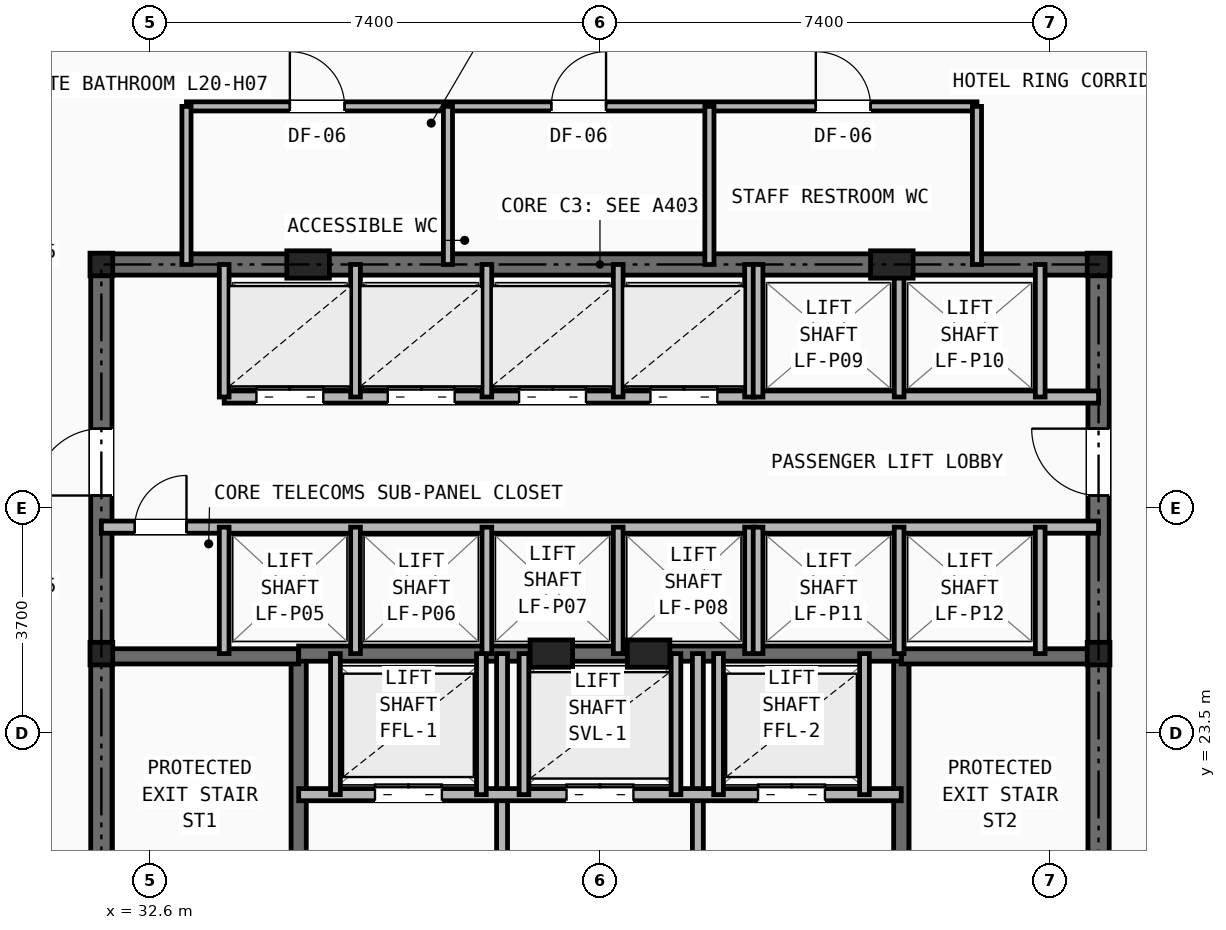
"""IFC4 building model, lengths in metres.
Left out: names, types, materials, properties, quantities, classifications, styles, units other than length and angle.
Written with IfcOpenShell. Run it as: python <this file> out.ifc"""

import sys

from ifc_helpers import new_model, si_unit, direction, frame, frame_2d, origin, origin_2d, place, context, subcontext, project, spatial, rectangle, i_section, extrude, element, fill, save


model = new_model("IFC4")
c1 = context("Model", 3, precision=1e-05, world=origin(), true_north=direction((0.0, 1.0)))
c2 = subcontext(c1, "Body", "Model", "MODEL_VIEW")
j1 = project(units=[si_unit("LENGTHUNIT", "METRE"), si_unit("PLANEANGLEUNIT", "RADIAN")], contexts=[c1])
p1 = place(None, origin())
s1 = spatial("IfcSite", under=j1, at=p1, CompositionType="ELEMENT")
p2 = place(p1, origin())
s2 = spatial("IfcBuilding", under=s1, at=p2, CompositionType="ELEMENT")
p3 = place(p2, frame((0.0, 0.0, 73.4)))
s3 = spatial("IfcBuildingStorey", under=s2, at=p3, CompositionType="ELEMENT", Elevation=73.4)
for number, where, z_axis, x_axis in (
    (1, (31.8, 24.8, 0.0), (0.0, 0.0, 1.0), (1.0, 0.0, 0.0)),
    (2, (48.2, 24.8, 0.0), (0.0, 0.0, 1.0), (1.0, 0.0, 0.0)),
    (3, (31.8, 31.2, 0.0), (0.0, 0.0, 1.0), (1.0, 0.0, 0.0)),
    (4, (48.2, 31.2, 0.0), (0.0, 0.0, 1.0), (1.0, 0.0, 0.0)),
):
    element("IfcColumn", number, at=place(p3, frame(where, z_axis=z_axis, x_axis=x_axis)), inside=s3, PredefinedType="COLUMN", context=c2, shape_type="SweptSolid", body=[
        extrude(i_section(OverallWidth=0.374, OverallDepth=0.372, WebThickness=0.016, FlangeThickness=0.026, at=origin_2d()), origin(), (0.0, 0.0, 1.0), 3.2),
    ])
for number, where, z_axis, x_axis in (
    (5, (35.2, 31.2, 0.0), (0.0, 0.0, 1.0), (1.0, 0.0, 0.0)),
    (6, (44.8, 31.2, 0.0), (0.0, 0.0, 1.0), (1.0, 0.0, 0.0)),
    (7, (39.2, 24.8, 0.0), (0.0, 0.0, 1.0), (1.0, 0.0, 0.0)),
    (8, (40.8, 24.8, 0.0), (0.0, 0.0, 1.0), (1.0, 0.0, 0.0)),
):
    element("IfcColumn", number, at=place(p3, frame(where, z_axis=z_axis, x_axis=x_axis)), inside=s3, PredefinedType="PILASTER", context=c2, shape_type="SweptSolid", body=[
        extrude(rectangle(XDim=0.7, YDim=0.45, at=origin_2d()), origin(), (0.0, 0.0, 1.0), 3.2),
    ])
p4 = place(p3, frame((31.8, 31.2, 0.0), z_axis=(0.0, 0.0, 1.0), x_axis=(1.0, 0.0, 0.0)))
e9 = element("IfcWall", 9, at=p4, inside=s3, PredefinedType="SHEAR", context=c2, shape_type="SweptSolid", body=[
    extrude(rectangle(XDim=16.4, YDim=0.35, at=frame_2d((8.2, 0.0))), origin(), (0.0, 0.0, 1.0), 2.97),
])
p5 = place(p3, frame((31.8, 16.4, 0.0), z_axis=(0.0, 0.0, 1.0), x_axis=(0.0, 1.0, 0.0)))
e10 = element("IfcWall", 10, at=p5, inside=s3, PredefinedType="SHEAR", context=c2, shape_type="SweptSolid", body=[
    extrude(rectangle(XDim=14.8, YDim=0.35, at=frame_2d((7.4, 0.0))), origin(), (0.0, 0.0, 1.0), 2.97),
])
p6 = place(p5, frame((11.0, 0.0, 0.0)))
e11 = element("IfcOpeningElement", 11, at=p6, cuts=e10, PredefinedType="OPENING", context=c2, shape_type="SweptSolid", body=[
    extrude(rectangle(XDim=1.1, YDim=2.15, at=frame_2d((0.55, 1.075))), frame((0.0, 0.185, 0.0), z_axis=(0.0, -1.0, 0.0), x_axis=(1.0, 0.0, 0.0)), (0.0, 0.0, 1.0), 0.37),
])
p7 = place(p3, frame((48.2, 16.4, 0.0), z_axis=(0.0, 0.0, 1.0), x_axis=(0.0, 1.0, 0.0)))
e12 = element("IfcWall", 12, at=p7, inside=s3, PredefinedType="SHEAR", context=c2, shape_type="SweptSolid", body=[
    extrude(rectangle(XDim=14.8, YDim=0.35, at=frame_2d((7.4, 0.0))), origin(), (0.0, 0.0, 1.0), 2.97),
])
p8 = place(p7, frame((11.0, 0.0, 0.0)))
e13 = element("IfcOpeningElement", 13, at=p8, cuts=e12, PredefinedType="OPENING", context=c2, shape_type="SweptSolid", body=[
    extrude(rectangle(XDim=1.1, YDim=2.15, at=frame_2d((0.55, 1.075))), frame((0.0, 0.185, 0.0), z_axis=(0.0, -1.0, 0.0), x_axis=(1.0, 0.0, 0.0)), (0.0, 0.0, 1.0), 0.37),
])
p9 = place(p3, frame((35.045, 16.4, 0.0), z_axis=(0.0, 0.0, 1.0), x_axis=(0.0, 1.0, 0.0)))
e14 = element("IfcWall", 14, at=p9, inside=s3, PredefinedType="SHEAR", context=c2, shape_type="SweptSolid", body=[
    extrude(rectangle(XDim=8.4, YDim=0.25, at=frame_2d((4.2, 0.0))), origin(), (0.0, 0.0, 1.0), 2.97),
])
p10 = place(p9, frame((0.45, 0.0, 0.0)))
e15 = element("IfcOpeningElement", 15, at=p10, cuts=e14, PredefinedType="OPENING", context=c2, shape_type="SweptSolid", body=[
    extrude(rectangle(XDim=0.95, YDim=2.1, at=frame_2d((0.475, 1.05))), frame((0.0, 0.135, 0.0), z_axis=(0.0, -1.0, 0.0), x_axis=(1.0, 0.0, 0.0)), (0.0, 0.0, 1.0), 0.27),
])
p11 = place(p3, frame((31.8, 24.755, 0.0), z_axis=(0.0, 0.0, 1.0), x_axis=(1.0, 0.0, 0.0)))
e16 = element("IfcWall", 16, at=p11, inside=s3, PredefinedType="SHEAR", context=c2, shape_type="SweptSolid", body=[
    extrude(rectangle(XDim=3.245, YDim=0.25, at=frame_2d((1.623, 0.0))), origin(), (0.0, 0.0, 1.0), 2.97),
])
p12 = place(p3, frame((44.955, 16.4, 0.0), z_axis=(0.0, 0.0, 1.0), x_axis=(0.0, 1.0, 0.0)))
e17 = element("IfcWall", 17, at=p12, inside=s3, PredefinedType="SHEAR", context=c2, shape_type="SweptSolid", body=[
    extrude(rectangle(XDim=8.4, YDim=0.25, at=frame_2d((4.2, 0.0))), origin(), (0.0, 0.0, 1.0), 2.97),
])
p13 = place(p12, frame((0.45, 0.0, 0.0)))
e18 = element("IfcOpeningElement", 18, at=p13, cuts=e17, PredefinedType="OPENING", context=c2, shape_type="SweptSolid", body=[
    extrude(rectangle(XDim=0.95, YDim=2.1, at=frame_2d((0.475, 1.05))), frame((0.0, 0.135, 0.0), z_axis=(0.0, -1.0, 0.0), x_axis=(1.0, 0.0, 0.0)), (0.0, 0.0, 1.0), 0.27),
])
p14 = place(p3, frame((44.955, 24.755, 0.0), z_axis=(0.0, 0.0, 1.0), x_axis=(1.0, 0.0, 0.0)))
e19 = element("IfcWall", 19, at=p14, inside=s3, PredefinedType="SHEAR", context=c2, shape_type="SweptSolid", body=[
    extrude(rectangle(XDim=3.245, YDim=0.25, at=frame_2d((1.623, 0.0))), origin(), (0.0, 0.0, 1.0), 2.97),
])
p15 = place(p3, frame((35.045, 24.8, 0.0), z_axis=(0.0, 0.0, 1.0), x_axis=(1.0, 0.0, 0.0)))
e20 = element("IfcWall", 20, at=p15, inside=s3, PredefinedType="SHEAR", context=c2, shape_type="SweptSolid", body=[
    extrude(rectangle(XDim=9.91, YDim=0.25, at=frame_2d((4.955, 0.0))), origin(), (0.0, 0.0, 1.0), 2.97),
])
p16 = place(p3, frame((38.39, 16.4, 0.0), z_axis=(0.0, 0.0, 1.0), x_axis=(0.0, 1.0, 0.0)))
e21 = element("IfcWall", 21, at=p16, inside=s3, PredefinedType="PARTITIONING", context=c2, shape_type="SweptSolid", body=[
    extrude(rectangle(XDim=8.4, YDim=0.18, at=frame_2d((4.2, 0.0))), origin(), (0.0, 0.0, 1.0), 2.698),
])
p17 = place(p16, frame((3.85, 0.0, 0.0)))
e22 = element("IfcOpeningElement", 22, at=p17, cuts=e21, PredefinedType="OPENING", context=c2, shape_type="SweptSolid", body=[
    extrude(rectangle(XDim=0.95, YDim=2.1, at=frame_2d((0.475, 1.05))), frame((0.0, 0.1, 0.0), z_axis=(0.0, -1.0, 0.0), x_axis=(1.0, 0.0, 0.0)), (0.0, 0.0, 1.0), 0.2),
])
p18 = place(p3, frame((41.61, 16.4, 0.0), z_axis=(0.0, 0.0, 1.0), x_axis=(0.0, 1.0, 0.0)))
e23 = element("IfcWall", 23, at=p18, inside=s3, PredefinedType="PARTITIONING", context=c2, shape_type="SweptSolid", body=[
    extrude(rectangle(XDim=8.4, YDim=0.18, at=frame_2d((4.2, 0.0))), origin(), (0.0, 0.0, 1.0), 2.698),
])
p19 = place(p3, frame((35.045, 22.48, 0.0), z_axis=(0.0, 0.0, 1.0), x_axis=(1.0, 0.0, 0.0)))
e24 = element("IfcWall", 24, at=p19, inside=s3, PredefinedType="SOLIDWALL", context=c2, shape_type="SweptSolid", body=[
    extrude(rectangle(XDim=9.91, YDim=0.2, at=frame_2d((4.955, 0.0))), origin(), (0.0, 0.0, 1.0), 2.97),
])
p20 = place(p19, frame((1.255, 0.0, 0.0)))
e25 = element("IfcOpeningElement", 25, at=p20, cuts=e24, PredefinedType="OPENING", context=c2, shape_type="SweptSolid", body=[
    extrude(rectangle(XDim=1.1, YDim=2.15, at=frame_2d((0.55, 1.075))), frame((0.0, 0.11, 0.0), z_axis=(0.0, -1.0, 0.0), x_axis=(1.0, 0.0, 0.0)), (0.0, 0.0, 1.0), 0.22),
])
p21 = place(p19, frame((7.555, 0.0, 0.0)))
e26 = element("IfcOpeningElement", 26, at=p21, cuts=e24, PredefinedType="OPENING", context=c2, shape_type="SweptSolid", body=[
    extrude(rectangle(XDim=1.1, YDim=2.15, at=frame_2d((0.55, 1.075))), frame((0.0, 0.11, 0.0), z_axis=(0.0, -1.0, 0.0), x_axis=(1.0, 0.0, 0.0)), (0.0, 0.0, 1.0), 0.22),
])
p22 = place(p19, frame((4.405, 0.0, 0.0)))
e27 = element("IfcOpeningElement", 27, at=p22, cuts=e24, PredefinedType="OPENING", context=c2, shape_type="SweptSolid", body=[
    extrude(rectangle(XDim=1.1, YDim=2.15, at=frame_2d((0.55, 1.075))), frame((0.0, 0.11, 0.0), z_axis=(0.0, -1.0, 0.0), x_axis=(1.0, 0.0, 0.0)), (0.0, 0.0, 1.0), 0.22),
])
for number, where, z_axis, x_axis in (
    (28, (35.65, 22.48, 0.0), (0.0, 0.0, 1.0), (0.0, 1.0, 0.0)),
    (29, (38.05, 22.48, 0.0), (0.0, 0.0, 1.0), (0.0, 1.0, 0.0)),
    (30, (41.95, 22.48, 0.0), (0.0, 0.0, 1.0), (0.0, 1.0, 0.0)),
    (31, (44.35, 22.48, 0.0), (0.0, 0.0, 1.0), (0.0, 1.0, 0.0)),
    (32, (38.75, 22.48, 0.0), (0.0, 0.0, 1.0), (0.0, 1.0, 0.0)),
    (33, (41.25, 22.48, 0.0), (0.0, 0.0, 1.0), (0.0, 1.0, 0.0)),
):
    element("IfcWall", number, at=place(p3, frame(where, z_axis=z_axis, x_axis=x_axis)), inside=s3, PredefinedType="SOLIDWALL", context=c2, shape_type="SweptSolid", body=[
        extrude(rectangle(XDim=2.32, YDim=0.16, at=frame_2d((1.16, 0.0))), origin(), (0.0, 0.0, 1.0), 2.97),
    ])
p23 = place(p3, frame((33.82, 29.02, 0.0), z_axis=(0.0, 0.0, 1.0), x_axis=(1.0, 0.0, 0.0)))
e34 = element("IfcWall", 34, at=p23, inside=s3, PredefinedType="SOLIDWALL", context=c2, shape_type="SweptSolid", body=[
    extrude(rectangle(XDim=14.38, YDim=0.2, at=frame_2d((7.19, 0.0))), origin(), (0.0, 0.0, 1.0), 2.421),
])
p24 = place(p23, frame((0.53, 0.0, 0.0)))
e35 = element("IfcOpeningElement", 35, at=p24, cuts=e34, PredefinedType="OPENING", context=c2, shape_type="SweptSolid", body=[
    extrude(rectangle(XDim=1.1, YDim=2.15, at=frame_2d((0.55, 1.075))), frame((0.0, 0.11, 0.0), z_axis=(0.0, -1.0, 0.0), x_axis=(1.0, 0.0, 0.0)), (0.0, 0.0, 1.0), 0.22),
])
p25 = place(p23, frame((2.69, 0.0, 0.0)))
e36 = element("IfcOpeningElement", 36, at=p25, cuts=e34, PredefinedType="OPENING", context=c2, shape_type="SweptSolid", body=[
    extrude(rectangle(XDim=1.1, YDim=2.15, at=frame_2d((0.55, 1.075))), frame((0.0, 0.11, 0.0), z_axis=(0.0, -1.0, 0.0), x_axis=(1.0, 0.0, 0.0)), (0.0, 0.0, 1.0), 0.22),
])
p26 = place(p23, frame((4.85, 0.0, 0.0)))
e37 = element("IfcOpeningElement", 37, at=p26, cuts=e34, PredefinedType="OPENING", context=c2, shape_type="SweptSolid", body=[
    extrude(rectangle(XDim=1.1, YDim=2.15, at=frame_2d((0.55, 1.075))), frame((0.0, 0.11, 0.0), z_axis=(0.0, -1.0, 0.0), x_axis=(1.0, 0.0, 0.0)), (0.0, 0.0, 1.0), 0.22),
])
p27 = place(p23, frame((7.01, 0.0, 0.0)))
e38 = element("IfcOpeningElement", 38, at=p27, cuts=e34, PredefinedType="OPENING", context=c2, shape_type="SweptSolid", body=[
    extrude(rectangle(XDim=1.1, YDim=2.15, at=frame_2d((0.55, 1.075))), frame((0.0, 0.11, 0.0), z_axis=(0.0, -1.0, 0.0), x_axis=(1.0, 0.0, 0.0)), (0.0, 0.0, 1.0), 0.22),
])
p28 = place(p3, frame((31.8, 26.88, 0.0), z_axis=(0.0, 0.0, 1.0), x_axis=(1.0, 0.0, 0.0)))
e39 = element("IfcWall", 39, at=p28, inside=s3, PredefinedType="SOLIDWALL", context=c2, shape_type="SweptSolid", body=[
    extrude(rectangle(XDim=16.4, YDim=0.2, at=frame_2d((8.2, 0.0))), origin(), (0.0, 0.0, 1.0), 2.421),
])
p29 = place(p28, frame((0.55, 0.0, 0.0)))
e40 = element("IfcOpeningElement", 40, at=p29, cuts=e39, PredefinedType="OPENING", context=c2, shape_type="SweptSolid", body=[
    extrude(rectangle(XDim=0.85, YDim=2.05, at=frame_2d((0.425, 1.025))), frame((0.0, 0.11, 0.0), z_axis=(0.0, -1.0, 0.0), x_axis=(1.0, 0.0, 0.0)), (0.0, 0.0, 1.0), 0.22),
])
p30 = place(p3, frame((33.82, 29.02, 0.0), z_axis=(0.0, 0.0, 1.0), x_axis=(0.0, 1.0, 0.0)))
e41 = element("IfcWall", 41, at=p30, inside=s3, PredefinedType="SOLIDWALL", context=c2, shape_type="SweptSolid", body=[
    extrude(rectangle(XDim=2.18, YDim=0.16, at=frame_2d((1.09, 0.0))), origin(), (0.0, 0.0, 1.0), 2.698),
])
p31 = place(p3, frame((33.82, 24.8, 0.0), z_axis=(0.0, 0.0, 1.0), x_axis=(0.0, 1.0, 0.0)))
e42 = element("IfcWall", 42, at=p31, inside=s3, PredefinedType="SOLIDWALL", context=c2, shape_type="SweptSolid", body=[
    extrude(rectangle(XDim=2.08, YDim=0.16, at=frame_2d((1.04, 0.0))), origin(), (0.0, 0.0, 1.0), 2.97),
])
for number, where, z_axis, x_axis in (
    (43, (35.98, 29.02, 0.0), (0.0, 0.0, 1.0), (0.0, 1.0, 0.0)),
    (44, (38.14, 29.02, 0.0), (0.0, 0.0, 1.0), (0.0, 1.0, 0.0)),
    (45, (40.3, 29.02, 0.0), (0.0, 0.0, 1.0), (0.0, 1.0, 0.0)),
    (46, (42.46, 29.02, 0.0), (0.0, 0.0, 1.0), (0.0, 1.0, 0.0)),
):
    element("IfcWall", number, at=place(p3, frame(where, z_axis=z_axis, x_axis=x_axis)), inside=s3, PredefinedType="SOLIDWALL", context=c2, shape_type="SweptSolid", body=[
        extrude(rectangle(XDim=2.18, YDim=0.16, at=frame_2d((1.09, 0.0))), origin(), (0.0, 0.0, 1.0), 2.698),
    ])
for number, where, z_axis, x_axis in (
    (47, (35.98, 24.8, 0.0), (0.0, 0.0, 1.0), (0.0, 1.0, 0.0)),
    (48, (38.14, 24.8, 0.0), (0.0, 0.0, 1.0), (0.0, 1.0, 0.0)),
    (49, (40.3, 24.8, 0.0), (0.0, 0.0, 1.0), (0.0, 1.0, 0.0)),
    (50, (42.46, 24.8, 0.0), (0.0, 0.0, 1.0), (0.0, 1.0, 0.0)),
):
    element("IfcWall", number, at=place(p3, frame(where, z_axis=z_axis, x_axis=x_axis)), inside=s3, PredefinedType="SOLIDWALL", context=c2, shape_type="SweptSolid", body=[
        extrude(rectangle(XDim=2.08, YDim=0.16, at=frame_2d((1.04, 0.0))), origin(), (0.0, 0.0, 1.0), 2.97),
    ])
for number, where, z_axis, x_axis in (
    (51, (42.6, 29.02, 0.0), (0.0, 0.0, 1.0), (0.0, 1.0, 0.0)),
    (52, (44.92, 29.02, 0.0), (0.0, 0.0, 1.0), (0.0, 1.0, 0.0)),
    (53, (47.24, 29.02, 0.0), (0.0, 0.0, 1.0), (0.0, 1.0, 0.0)),
):
    element("IfcWall", number, at=place(p3, frame(where, z_axis=z_axis, x_axis=x_axis)), inside=s3, PredefinedType="SOLIDWALL", context=c2, shape_type="SweptSolid", body=[
        extrude(rectangle(XDim=2.18, YDim=0.16, at=frame_2d((1.09, 0.0))), origin(), (0.0, 0.0, 1.0), 2.698),
    ])
for number, where, z_axis, x_axis in (
    (54, (42.6, 24.8, 0.0), (0.0, 0.0, 1.0), (0.0, 1.0, 0.0)),
    (55, (44.92, 24.8, 0.0), (0.0, 0.0, 1.0), (0.0, 1.0, 0.0)),
    (56, (47.24, 24.8, 0.0), (0.0, 0.0, 1.0), (0.0, 1.0, 0.0)),
):
    element("IfcWall", number, at=place(p3, frame(where, z_axis=z_axis, x_axis=x_axis)), inside=s3, PredefinedType="SOLIDWALL", context=c2, shape_type="SweptSolid", body=[
        extrude(rectangle(XDim=2.08, YDim=0.16, at=frame_2d((1.04, 0.0))), origin(), (0.0, 0.0, 1.0), 2.97),
    ])
p32 = place(p3, frame((33.2, 33.8, 0.0), z_axis=(0.0, 0.0, 1.0), x_axis=(1.0, 0.0, 0.0)))
e57 = element("IfcWall", 57, at=p32, inside=s3, PredefinedType="PARTITIONING", context=c2, shape_type="SweptSolid", body=[
    extrude(rectangle(XDim=13.0, YDim=0.15, at=frame_2d((6.5, 0.0))), origin(), (0.0, 0.0, 1.0), 2.97),
])
p33 = place(p32, frame((1.7, 0.0, 0.0)))
e58 = element("IfcOpeningElement", 58, at=p33, cuts=e57, PredefinedType="OPENING", context=c2, shape_type="SweptSolid", body=[
    extrude(rectangle(XDim=0.9, YDim=2.1, at=frame_2d((0.45, 1.05))), frame((0.0, 0.085, 0.0), z_axis=(0.0, -1.0, 0.0), x_axis=(1.0, 0.0, 0.0)), (0.0, 0.0, 1.0), 0.17),
])
p34 = place(p32, frame((6.0, 0.0, 0.0)))
e59 = element("IfcOpeningElement", 59, at=p34, cuts=e57, PredefinedType="OPENING", context=c2, shape_type="SweptSolid", body=[
    extrude(rectangle(XDim=0.9, YDim=2.1, at=frame_2d((0.45, 1.05))), frame((0.0, 0.085, 0.0), z_axis=(0.0, -1.0, 0.0), x_axis=(1.0, 0.0, 0.0)), (0.0, 0.0, 1.0), 0.17),
])
p35 = place(p32, frame((10.35, 0.0, 0.0)))
e60 = element("IfcOpeningElement", 60, at=p35, cuts=e57, PredefinedType="OPENING", context=c2, shape_type="SweptSolid", body=[
    extrude(rectangle(XDim=0.9, YDim=2.1, at=frame_2d((0.45, 1.05))), frame((0.0, 0.085, 0.0), z_axis=(0.0, -1.0, 0.0), x_axis=(1.0, 0.0, 0.0)), (0.0, 0.0, 1.0), 0.17),
])
for number, where, z_axis, x_axis in (
    (61, (33.2, 31.2, 0.0), (0.0, 0.0, 1.0), (0.0, 1.0, 0.0)),
    (62, (46.2, 31.2, 0.0), (0.0, 0.0, 1.0), (0.0, 1.0, 0.0)),
    (63, (37.5, 31.2, 0.0), (0.0, 0.0, 1.0), (0.0, 1.0, 0.0)),
    (64, (41.8, 31.2, 0.0), (0.0, 0.0, 1.0), (0.0, 1.0, 0.0)),
):
    element("IfcWall", number, at=place(p3, frame(where, z_axis=z_axis, x_axis=x_axis)), inside=s3, PredefinedType="PARTITIONING", context=c2, shape_type="SweptSolid", body=[
        extrude(rectangle(XDim=2.6, YDim=0.15, at=frame_2d((1.3, 0.0))), origin(), (0.0, 0.0, 1.0), 2.698),
    ])
p36 = place(p20, origin())
e65 = element("IfcDoor", 65, at=p36, inside=s3, OperationType="DOUBLE_DOOR_SLIDING", PredefinedType="DOOR", context=c2, shape_type="SweptSolid", body=[
    extrude(rectangle(XDim=1.1, YDim=2.15, at=frame_2d((0.55, 1.075))), frame((0.0, 0.025, 0.0), z_axis=(0.0, -1.0, 0.0), x_axis=(1.0, 0.0, 0.0)), (0.0, 0.0, 1.0), 0.05),
])
fill(e25, e65)
p37 = place(p21, origin())
e66 = element("IfcDoor", 66, at=p37, inside=s3, OperationType="DOUBLE_DOOR_SLIDING", PredefinedType="DOOR", context=c2, shape_type="SweptSolid", body=[
    extrude(rectangle(XDim=1.1, YDim=2.15, at=frame_2d((0.55, 1.075))), frame((0.0, 0.025, 0.0), z_axis=(0.0, -1.0, 0.0), x_axis=(1.0, 0.0, 0.0)), (0.0, 0.0, 1.0), 0.05),
])
fill(e26, e66)
p38 = place(p22, origin())
e67 = element("IfcDoor", 67, at=p38, inside=s3, OperationType="DOUBLE_DOOR_SLIDING", PredefinedType="DOOR", context=c2, shape_type="SweptSolid", body=[
    extrude(rectangle(XDim=1.1, YDim=2.15, at=frame_2d((0.55, 1.075))), frame((0.0, 0.025, 0.0), z_axis=(0.0, -1.0, 0.0), x_axis=(1.0, 0.0, 0.0)), (0.0, 0.0, 1.0), 0.05),
])
fill(e27, e67)
p39 = place(p29, origin())
e68 = element("IfcDoor", 68, at=p39, inside=s3, OperationType="SINGLE_SWING_RIGHT", PredefinedType="DOOR", context=c2, shape_type="SweptSolid", body=[
    extrude(rectangle(XDim=0.85, YDim=2.05, at=frame_2d((0.425, 1.025))), frame((0.0, 0.025, 0.0), z_axis=(0.0, -1.0, 0.0), x_axis=(1.0, 0.0, 0.0)), (0.0, 0.0, 1.0), 0.05),
])
fill(e40, e68)
p40 = place(p6, origin())
e69 = element("IfcDoor", 69, at=p40, inside=s3, OperationType="SINGLE_SWING_LEFT", PredefinedType="DOOR", context=c2, shape_type="SweptSolid", body=[
    extrude(rectangle(XDim=1.1, YDim=2.15, at=frame_2d((0.55, 1.075))), frame((0.0, 0.025, 0.0), z_axis=(0.0, -1.0, 0.0), x_axis=(1.0, 0.0, 0.0)), (0.0, 0.0, 1.0), 0.05),
])
fill(e11, e69)
p41 = place(p8, origin())
e70 = element("IfcDoor", 70, at=p41, inside=s3, OperationType="SINGLE_SWING_RIGHT", PredefinedType="DOOR", context=c2, shape_type="SweptSolid", body=[
    extrude(rectangle(XDim=1.1, YDim=2.15, at=frame_2d((0.55, 1.075))), frame((0.0, 0.025, 0.0), z_axis=(0.0, -1.0, 0.0), x_axis=(1.0, 0.0, 0.0)), (0.0, 0.0, 1.0), 0.05),
])
fill(e13, e70)
p42 = place(p24, origin())
e71 = element("IfcDoor", 71, at=p42, inside=s3, OperationType="DOUBLE_DOOR_SLIDING", PredefinedType="DOOR", context=c2, shape_type="SweptSolid", body=[
    extrude(rectangle(XDim=1.1, YDim=2.15, at=frame_2d((0.55, 1.075))), frame((0.0, 0.025, 0.0), z_axis=(0.0, -1.0, 0.0), x_axis=(1.0, 0.0, 0.0)), (0.0, 0.0, 1.0), 0.05),
])
fill(e35, e71)
p43 = place(p25, origin())
e72 = element("IfcDoor", 72, at=p43, inside=s3, OperationType="DOUBLE_DOOR_SLIDING", PredefinedType="DOOR", context=c2, shape_type="SweptSolid", body=[
    extrude(rectangle(XDim=1.1, YDim=2.15, at=frame_2d((0.55, 1.075))), frame((0.0, 0.025, 0.0), z_axis=(0.0, -1.0, 0.0), x_axis=(1.0, 0.0, 0.0)), (0.0, 0.0, 1.0), 0.05),
])
fill(e36, e72)
p44 = place(p26, origin())
e73 = element("IfcDoor", 73, at=p44, inside=s3, OperationType="DOUBLE_DOOR_SLIDING", PredefinedType="DOOR", context=c2, shape_type="SweptSolid", body=[
    extrude(rectangle(XDim=1.1, YDim=2.15, at=frame_2d((0.55, 1.075))), frame((0.0, 0.025, 0.0), z_axis=(0.0, -1.0, 0.0), x_axis=(1.0, 0.0, 0.0)), (0.0, 0.0, 1.0), 0.05),
])
fill(e37, e73)
p45 = place(p27, origin())
e74 = element("IfcDoor", 74, at=p45, inside=s3, OperationType="DOUBLE_DOOR_SLIDING", PredefinedType="DOOR", context=c2, shape_type="SweptSolid", body=[
    extrude(rectangle(XDim=1.1, YDim=2.15, at=frame_2d((0.55, 1.075))), frame((0.0, 0.025, 0.0), z_axis=(0.0, -1.0, 0.0), x_axis=(1.0, 0.0, 0.0)), (0.0, 0.0, 1.0), 0.05),
])
fill(e38, e74)
p46 = place(p33, origin())
e75 = element("IfcDoor", 75, at=p46, inside=s3, OperationType="SINGLE_SWING_LEFT", PredefinedType="DOOR", context=c2, shape_type="SweptSolid", body=[
    extrude(rectangle(XDim=0.9, YDim=2.1, at=frame_2d((0.45, 1.05))), frame((0.0, 0.025, 0.0), z_axis=(0.0, -1.0, 0.0), x_axis=(1.0, 0.0, 0.0)), (0.0, 0.0, 1.0), 0.05),
])
fill(e58, e75)
p47 = place(p34, origin())
e76 = element("IfcDoor", 76, at=p47, inside=s3, OperationType="SINGLE_SWING_RIGHT", PredefinedType="DOOR", context=c2, shape_type="SweptSolid", body=[
    extrude(rectangle(XDim=0.9, YDim=2.1, at=frame_2d((0.45, 1.05))), frame((0.0, 0.025, 0.0), z_axis=(0.0, -1.0, 0.0), x_axis=(1.0, 0.0, 0.0)), (0.0, 0.0, 1.0), 0.05),
])
fill(e59, e76)
p48 = place(p35, origin())
e77 = element("IfcDoor", 77, at=p48, inside=s3, OperationType="SINGLE_SWING_LEFT", PredefinedType="DOOR", context=c2, shape_type="SweptSolid", body=[
    extrude(rectangle(XDim=0.9, YDim=2.1, at=frame_2d((0.45, 1.05))), frame((0.0, 0.025, 0.0), z_axis=(0.0, -1.0, 0.0), x_axis=(1.0, 0.0, 0.0)), (0.0, 0.0, 1.0), 0.05),
])
fill(e60, e77)
save(model, sys.argv[1])
